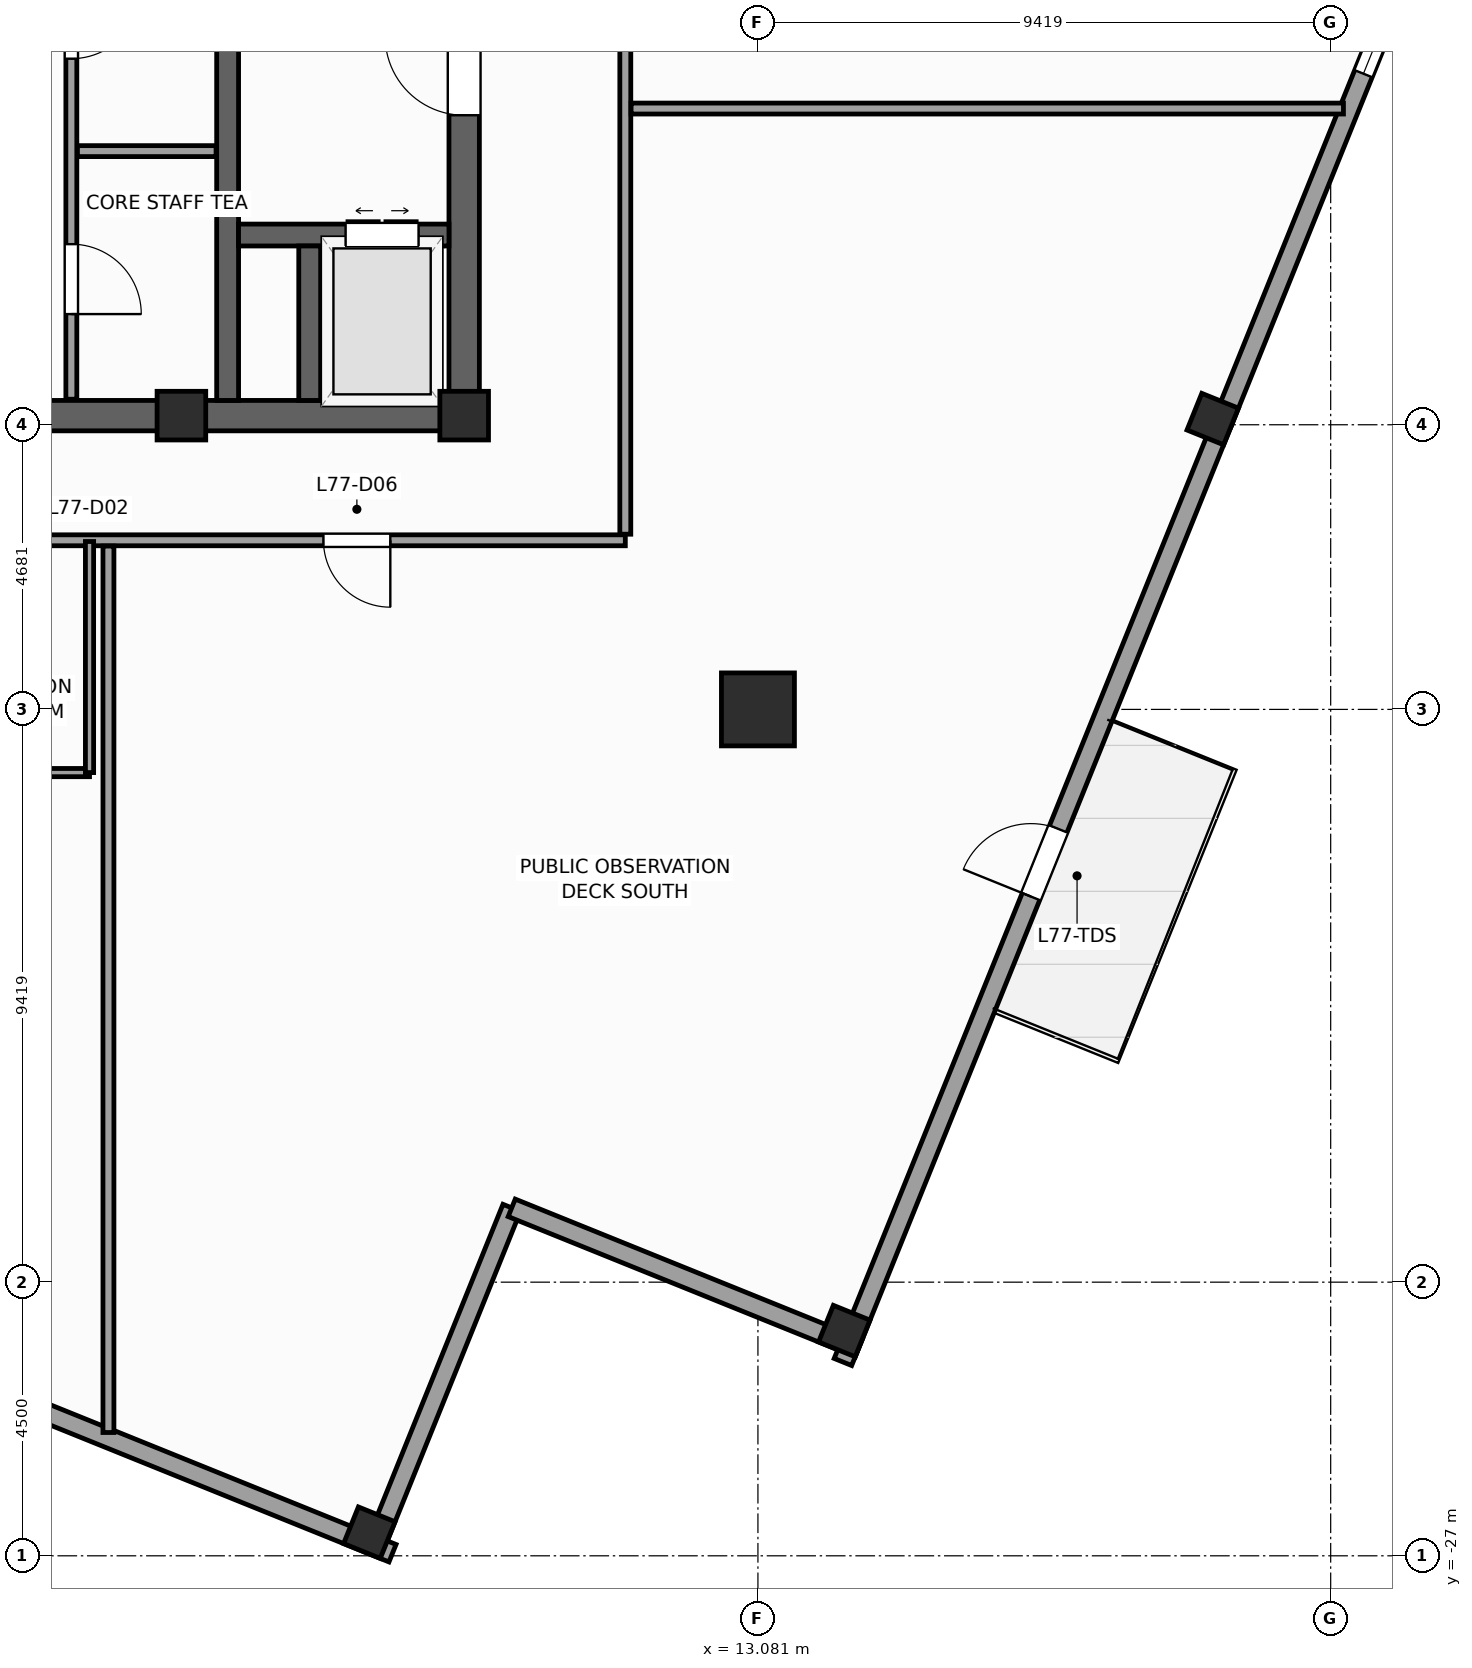
"""IFC4 building model, lengths in metres.
Left out: names, types, materials, properties, quantities, classifications, styles, units other than length and angle.
Written with IfcOpenShell. Run it as: python <this file> out.ifc"""

import sys

from ifc_helpers import new_model, si_unit, direction, frame, frame_2d, origin, origin_2d, place, context, subcontext, project, spatial, rectangle, extrude, source, transform, mapped, element, fill, save


model = new_model("IFC4")
c1 = context("Model", 3, precision=1e-05, world=origin(), true_north=direction((0.0, 1.0)))
c2 = subcontext(c1, "Body", "Model", "MODEL_VIEW")
j1 = project(units=[si_unit("LENGTHUNIT", "METRE"), si_unit("PLANEANGLEUNIT", "RADIAN")], contexts=[c1])
p1 = place(None, origin())
s1 = spatial("IfcSite", under=j1, at=p1, CompositionType="ELEMENT")
p2 = place(p1, origin())
s2 = spatial("IfcBuilding", under=s1, at=p2, CompositionType="ELEMENT")
p3 = place(p2, frame((0.0, 0.0, 312.0)))
s3 = spatial("IfcBuildingStorey", under=s2, at=p3, CompositionType="ELEMENT", Elevation=312.0)
p4 = place(p3, frame((-8.5, -8.25, 0.0), z_axis=(0.0, 0.0, 1.0), x_axis=(1.0, 0.0, 0.0)))
e1 = element("IfcWall", 1, at=p4, inside=s3, PredefinedType="SHEAR", context=c2, shape_type="SweptSolid", body=[
    extrude(rectangle(XDim=17.0, YDim=0.5, at=frame_2d((8.5, 0.0))), origin(), (0.0, 0.0, 1.0), 4.8),
])
p5 = place(p4, frame((7.85, 0.0, 0.0)))
e2 = element("IfcOpeningElement", 2, at=p5, cuts=e1, PredefinedType="OPENING", context=c2, shape_type="SweptSolid", body=[
    extrude(rectangle(XDim=1.3, YDim=2.2, at=frame_2d((0.65, 1.1))), frame((0.0, 0.26, 0.0), z_axis=(0.0, -1.0, 0.0), x_axis=(1.0, 0.0, 0.0)), (0.0, 0.0, 1.0), 0.52),
])
p6 = place(p3, frame((8.25, -8.0, 0.0), z_axis=(0.0, 0.0, 1.0), x_axis=(0.0, 1.0, 0.0)))
e3 = element("IfcWall", 3, at=p6, inside=s3, PredefinedType="SHEAR", context=c2, shape_type="SweptSolid", body=[
    extrude(rectangle(XDim=16.0, YDim=0.5, at=frame_2d((8.0, 0.0))), origin(), (0.0, 0.0, 1.0), 4.8),
])
p7 = place(p6, frame((4.69, 0.0, 0.0)))
e4 = element("IfcOpeningElement", 4, at=p7, cuts=e3, PredefinedType="OPENING", context=c2, shape_type="SweptSolid", body=[
    extrude(rectangle(XDim=1.3, YDim=2.2, at=frame_2d((0.65, 1.1))), frame((0.0, 0.26, 0.0), z_axis=(0.0, -1.0, 0.0), x_axis=(1.0, 0.0, 0.0)), (0.0, 0.0, 1.0), 0.52),
])
p8 = place(p3, frame((4.36, -8.0, 0.0), z_axis=(0.0, 0.0, 1.0), x_axis=(0.0, 1.0, 0.0)))
e5 = element("IfcWall", 5, at=p8, inside=s3, PredefinedType="SHEAR", context=c2, shape_type="SweptSolid", body=[
    extrude(rectangle(XDim=16.0, YDim=0.36, at=frame_2d((8.0, 0.0))), origin(), (0.0, 0.0, 1.0), 4.8),
])
p9 = place(p3, frame((4.54, -5.28, 0.0), z_axis=(0.0, 0.0, 1.0), x_axis=(1.0, 0.0, 0.0)))
e6 = element("IfcWall", 6, at=p9, inside=s3, PredefinedType="SHEAR", context=c2, shape_type="SweptSolid", body=[
    extrude(rectangle(XDim=3.46, YDim=0.36, at=frame_2d((1.73, 0.0))), origin(), (0.0, 0.0, 1.0), 4.8),
])
p10 = place(p9, frame((1.76, 0.0, 0.0)))
e7 = element("IfcOpeningElement", 7, at=p10, cuts=e6, PredefinedType="OPENING", context=c2, shape_type="SweptSolid", body=[
    extrude(rectangle(XDim=1.2, YDim=2.25, at=frame_2d((0.6, 1.125))), frame((0.0, 0.19, 0.0), z_axis=(0.0, -1.0, 0.0), x_axis=(1.0, 0.0, 0.0)), (0.0, 0.0, 1.0), 0.38),
])
p11 = place(p3, frame((5.71, -8.0, 0.0), z_axis=(0.0, 0.0, 1.0), x_axis=(0.0, 1.0, 0.0)))
e8 = element("IfcWall", 8, at=p11, inside=s3, PredefinedType="SHEAR", context=c2, shape_type="SweptSolid", body=[
    extrude(rectangle(XDim=2.54, YDim=0.36, at=frame_2d((1.27, 0.0))), origin(), (0.0, 0.0, 1.0), 4.8),
])
m1 = source(origin(), c2, "Body", "SweptSolid", [
    extrude(rectangle(XDim=0.8, YDim=0.8, at=origin_2d()), origin(), (0.0, 0.0, 1.0), 4.8),
])
for number, where, z_axis, x_axis in (
    (9, (8.25, -8.25, 0.0), (0.0, 0.0, 1.0), (1.0, 0.0, 0.0)),
    (10, (3.6, -8.25, 0.0), (0.0, 0.0, 1.0), (1.0, 0.0, 0.0)),
):
    element("IfcColumn", number, at=place(p3, frame(where, z_axis=z_axis, x_axis=x_axis)), inside=s3, PredefinedType="PILASTER", context=c2, shape_type="MappedRepresentation", body=[
        mapped(m1, transform((0.0, 0.0, 0.0), scale=1.0)),
    ])
m2 = source(origin(), c2, "Body", "SweptSolid", [
    extrude(rectangle(XDim=1.2, YDim=1.2, at=origin_2d()), origin(), (0.0, 0.0, 1.0), 4.8),
])
p12 = place(p3, frame((13.081, -13.081, 0.0), z_axis=(0.0, 0.0, 1.0), x_axis=(1.0, 0.0, 0.0)))
e11 = element("IfcColumn", 11, at=p12, inside=s3, PredefinedType="COLUMN", context=c2, shape_type="MappedRepresentation", body=[
    mapped(m2, transform((0.0, 0.0, 0.0), scale=1.0)),
])
m3 = source(origin(), c2, "Body", "SweptSolid", [
    extrude(rectangle(XDim=0.65, YDim=0.65, at=origin_2d()), origin(), (0.0, 0.0, 1.0), 4.8),
])
for number, where, z_axis, x_axis in (
    (12, (14.501, -23.304, 0.0), (0.0, 0.0, 1.0), (0.375, 0.927, 0.0)),
    (13, (20.56, -8.307, 0.0), (0.0, 0.0, 1.0), (0.375, 0.927, 0.0)),
    (14, (6.69, -26.62, 0.0), (0.0, 0.0, 1.0), (0.375, 0.927, 0.0)),
):
    element("IfcColumn", number, at=place(p3, frame(where, z_axis=z_axis, x_axis=x_axis)), inside=s3, PredefinedType="COLUMN", context=c2, shape_type="MappedRepresentation", body=[
        mapped(m3, transform((0.0, 0.0, 0.0), scale=1.0)),
    ])
p13 = place(p3, frame((6.784, -26.841, 0.0), z_axis=(0.0, 0.0, 1.0), x_axis=(0.374636620962, 0.927171722085, 0.0)))
e15 = element("IfcWall", 15, at=p13, inside=s3, PredefinedType="STANDARD", context=c2, shape_type="SweptSolid", body=[
    extrude(rectangle(XDim=6.0, YDim=0.31, at=frame_2d((3.0, 0.0))), origin(), (0.0, 0.0, 1.0), 3.85),
])
p14 = place(p3, frame((9.032, -21.278, 0.0), z_axis=(0.0, 0.0, 1.0), x_axis=(0.927185411764, -0.374602739196, 0.0)))
e16 = element("IfcWall", 16, at=p14, inside=s3, PredefinedType="STANDARD", context=c2, shape_type="SweptSolid", body=[
    extrude(rectangle(XDim=6.155, YDim=0.31, at=frame_2d((3.078, 0.0))), origin(), (0.0, 0.0, 1.0), 4.55),
])
p15 = place(p3, frame((14.479, -23.813, 0.0), z_axis=(0.0, 0.0, 1.0), x_axis=(0.374618403537, 0.927179082881, 0.0)))
e17 = element("IfcWall", 17, at=p15, inside=s3, PredefinedType="STANDARD", context=c2, shape_type="SweptSolid", body=[
    extrude(rectangle(XDim=16.655, YDim=0.31, at=frame_2d((8.328, 0.0))), origin(), (0.0, 0.0, 1.0), 3.95),
])
p16 = place(p15, frame((8.255, 0.0, 0.0)))
e18 = element("IfcOpeningElement", 18, at=p16, cuts=e17, PredefinedType="OPENING", context=c2, shape_type="SweptSolid", body=[
    extrude(rectangle(XDim=1.2, YDim=2.3, at=frame_2d((0.6, 1.15))), frame((0.0, 0.165, 0.0), z_axis=(0.0, -1.0, 0.0), x_axis=(1.0, 0.0, 0.0)), (0.0, 0.0, 1.0), 0.33),
])
p17 = place(p3, frame((20.718, -8.371, 0.0), z_axis=(0.0, 0.0, 1.0), x_axis=(0.374600710538, 0.927186231382, 0.0)))
e19 = element("IfcWall", 19, at=p17, inside=s3, PredefinedType="STANDARD", context=c2, shape_type="SweptSolid", body=[
    extrude(rectangle(XDim=16.655, YDim=0.31, at=frame_2d((8.328, 0.0))), origin(), (0.0, 0.0, 1.0), 3.95),
])
p18 = place(p17, frame((6.195, 0.0, 0.65)))
e20 = element("IfcOpeningElement", 20, at=p18, cuts=e19, PredefinedType="OPENING", context=c2, shape_type="SweptSolid", body=[
    extrude(rectangle(XDim=2.6, YDim=3.0, at=frame_2d((1.3, 1.5))), frame((0.0, 0.165, 0.0), z_axis=(0.0, -1.0, 0.0), x_axis=(1.0, 0.0, 0.0)), (0.0, 0.0, 1.0), 0.33),
])
p19 = place(p3, frame((-9.298, -20.343, 0.0), z_axis=(0.0, 0.0, 1.0), x_axis=(0.927183654967, -0.374607087443, 0.0)))
e21 = element("IfcWall", 21, at=p19, inside=s3, PredefinedType="STANDARD", context=c2, shape_type="SweptSolid", body=[
    extrude(rectangle(XDim=17.655, YDim=0.31, at=frame_2d((8.828, 0.0))), origin(), (0.0, 0.0, 1.0), 3.95),
])
p20 = place(p19, frame((6.645, 0.0, 0.65)))
e22 = element("IfcOpeningElement", 22, at=p20, cuts=e21, PredefinedType="OPENING", context=c2, shape_type="SweptSolid", body=[
    extrude(rectangle(XDim=2.6, YDim=3.0, at=frame_2d((1.3, 1.5))), frame((0.0, 0.165, 0.0), z_axis=(0.0, -1.0, 0.0), x_axis=(1.0, 0.0, 0.0)), (0.0, 0.0, 1.0), 0.33),
])
p21 = place(p3, frame((1.79, -7.98, 0.0), z_axis=(0.0, 0.0, 1.0), x_axis=(0.0, 1.0, 0.0)))
e23 = element("IfcWall", 23, at=p21, inside=s3, PredefinedType="PARTITIONING", context=c2, shape_type="SweptSolid", body=[
    extrude(rectangle(XDim=12.38, YDim=0.18, at=frame_2d((6.19, 0.0))), origin(), (0.0, 0.0, 1.0), 4.55),
])
p22 = place(p21, frame((8.8, 0.0, 0.0)))
e24 = element("IfcOpeningElement", 24, at=p22, cuts=e23, PredefinedType="OPENING", context=c2, shape_type="SweptSolid", body=[
    extrude(rectangle(XDim=1.1, YDim=2.2, at=frame_2d((0.55, 1.1))), frame((0.0, 0.1, 0.0), z_axis=(0.0, -1.0, 0.0), x_axis=(1.0, 0.0, 0.0)), (0.0, 0.0, 1.0), 0.2),
])
p23 = place(p21, frame((10.86, 0.0, 0.0)))
e25 = element("IfcOpeningElement", 25, at=p23, cuts=e23, PredefinedType="OPENING", context=c2, shape_type="SweptSolid", body=[
    extrude(rectangle(XDim=1.1, YDim=2.2, at=frame_2d((0.55, 1.1))), frame((0.0, 0.1, 0.0), z_axis=(0.0, -1.0, 0.0), x_axis=(1.0, 0.0, 0.0)), (0.0, 0.0, 1.0), 0.2),
])
p24 = place(p21, frame((1.4, 0.0, 0.0)))
e26 = element("IfcOpeningElement", 26, at=p24, cuts=e23, PredefinedType="OPENING", context=c2, shape_type="SweptSolid", body=[
    extrude(rectangle(XDim=1.15, YDim=2.25, at=frame_2d((0.575, 1.125))), frame((0.0, 0.1, 0.0), z_axis=(0.0, -1.0, 0.0), x_axis=(1.0, 0.0, 0.0)), (0.0, 0.0, 1.0), 0.2),
])
p25 = place(p21, frame((5.6, 0.0, 0.0)))
e27 = element("IfcOpeningElement", 27, at=p25, cuts=e23, PredefinedType="OPENING", context=c2, shape_type="SweptSolid", body=[
    extrude(rectangle(XDim=1.15, YDim=2.25, at=frame_2d((0.575, 1.125))), frame((0.0, 0.1, 0.0), z_axis=(0.0, -1.0, 0.0), x_axis=(1.0, 0.0, 0.0)), (0.0, 0.0, 1.0), 0.2),
])
p26 = place(p3, frame((1.89, -3.9, 0.0), z_axis=(0.0, 0.0, 1.0), x_axis=(1.0, 0.0, 0.0)))
e28 = element("IfcWall", 28, at=p26, inside=s3, PredefinedType="PARTITIONING", context=c2, shape_type="SweptSolid", body=[
    extrude(rectangle(XDim=2.28, YDim=0.18, at=frame_2d((1.14, 0.0))), origin(), (0.0, 0.0, 1.0), 4.55),
])
p27 = place(p3, frame((-10.3, -10.3, 0.0), z_axis=(0.0, 0.0, 1.0), x_axis=(1.0, 0.0, 0.0)))
e29 = element("IfcWall", 29, at=p27, inside=s3, PredefinedType="PARTITIONING", context=c2, shape_type="SweptSolid", body=[
    extrude(rectangle(XDim=21.2, YDim=0.18, at=frame_2d((10.6, 0.0))), origin(), (0.0, 0.0, 1.0), 4.55),
])
p28 = place(p27, frame((10.514, 0.0, 0.0)))
e30 = element("IfcOpeningElement", 30, at=p28, cuts=e29, PredefinedType="OPENING", context=c2, shape_type="SweptSolid", body=[
    extrude(rectangle(XDim=0.95, YDim=2.1, at=frame_2d((0.475, 1.05))), frame((0.0, 0.1, 0.0), z_axis=(0.0, -1.0, 0.0), x_axis=(1.0, 0.0, 0.0)), (0.0, 0.0, 1.0), 0.2),
])
p29 = place(p27, frame((16.236, 0.0, 0.0)))
e31 = element("IfcOpeningElement", 31, at=p29, cuts=e29, PredefinedType="OPENING", context=c2, shape_type="SweptSolid", body=[
    extrude(rectangle(XDim=1.1, YDim=2.2, at=frame_2d((0.55, 1.1))), frame((0.0, 0.1, 0.0), z_axis=(0.0, -1.0, 0.0), x_axis=(1.0, 0.0, 0.0)), (0.0, 0.0, 1.0), 0.2),
])
p30 = place(p27, frame((4.415, 0.0, 0.0)))
e32 = element("IfcOpeningElement", 32, at=p30, cuts=e29, PredefinedType="OPENING", context=c2, shape_type="SweptSolid", body=[
    extrude(rectangle(XDim=1.1, YDim=2.2, at=frame_2d((0.55, 1.1))), frame((0.0, 0.1, 0.0), z_axis=(0.0, -1.0, 0.0), x_axis=(1.0, 0.0, 0.0)), (0.0, 0.0, 1.0), 0.2),
])
p31 = place(p3, frame((10.9, -10.2, 0.0), z_axis=(0.0, 0.0, 1.0), x_axis=(0.0, 1.0, 0.0)))
e33 = element("IfcWall", 33, at=p31, inside=s3, PredefinedType="PARTITIONING", context=c2, shape_type="SweptSolid", body=[
    extrude(rectangle(XDim=21.0, YDim=0.18, at=frame_2d((10.5, 0.0))), origin(), (0.0, 0.0, 1.0), 4.55),
])
p32 = place(p31, frame((9.65, 0.0, 0.0)))
e34 = element("IfcOpeningElement", 34, at=p32, cuts=e33, PredefinedType="OPENING", context=c2, shape_type="SweptSolid", body=[
    extrude(rectangle(XDim=1.1, YDim=2.2, at=frame_2d((0.55, 1.1))), frame((0.0, 0.1, 0.0), z_axis=(0.0, -1.0, 0.0), x_axis=(1.0, 0.0, 0.0)), (0.0, 0.0, 1.0), 0.2),
])
p33 = place(p3, frame((10.995, -3.2, 0.0), z_axis=(0.0, 0.0, 1.0), x_axis=(1.0, 0.0, 0.0)))
e35 = element("IfcWall", 35, at=p33, inside=s3, PredefinedType="PARTITIONING", context=c2, shape_type="SweptSolid", body=[
    extrude(rectangle(XDim=11.715, YDim=0.18, at=frame_2d((5.857, 0.0))), origin(), (0.0, 0.0, 1.0), 4.55),
])
p34 = place(p3, frame((2.4, -10.395, 0.0), z_axis=(0.0, 0.0, 1.0), x_axis=(0.0, -1.0, 0.0)))
e36 = element("IfcWall", 36, at=p34, inside=s3, PredefinedType="PARTITIONING", context=c2, shape_type="SweptSolid", body=[
    extrude(rectangle(XDim=14.577, YDim=0.18, at=frame_2d((7.289, 0.0))), origin(), (0.0, 0.0, 1.0), 4.22),
])
p35 = place(p3, frame((-0.711, -14.12, 0.0), z_axis=(0.0, 0.0, 1.0), x_axis=(1.0, 0.0, 0.0)))
e37 = element("IfcWall", 37, at=p35, inside=s3, PredefinedType="PARTITIONING", context=c2, shape_type="SweptSolid", body=[
    extrude(rectangle(XDim=2.8, YDim=0.135, at=frame_2d((1.4, 0.0))), origin(), (0.0, 0.0, 1.0), 4.55),
])
p36 = place(p3, frame((2.089, -14.12, 0.0), z_axis=(0.0, 0.0, 1.0), x_axis=(0.0, 1.0, 0.0)))
e38 = element("IfcWall", 38, at=p36, inside=s3, PredefinedType="PARTITIONING", context=c2, shape_type="SweptSolid", body=[
    extrude(rectangle(XDim=3.8, YDim=0.135, at=frame_2d((1.9, 0.0))), origin(), (0.0, 0.0, 1.0), 4.55),
])
m4 = source(origin(), c2, "Body", "SweptSolid", [
    extrude(rectangle(XDim=2.6, YDim=3.0, at=frame_2d((1.3, 1.5))), frame((0.0, 0.03, 0.0), z_axis=(0.0, -1.0, 0.0), x_axis=(1.0, 0.0, 0.0)), (0.0, 0.0, 1.0), 0.06),
])
p37 = place(p18, origin())
e39 = element("IfcWindow", 39, at=p37, inside=s3, PartitioningType="SINGLE_PANEL", PredefinedType="WINDOW", context=c2, shape_type="MappedRepresentation", body=[
    mapped(m4, transform((0.0, 0.0, 0.0), scale=1.0)),
])
fill(e20, e39)
m5 = source(origin(), c2, "Body", "SweptSolid", [
    extrude(rectangle(XDim=1.2, YDim=2.3, at=frame_2d((0.6, 1.15))), frame((0.0, 0.025, 0.0), z_axis=(0.0, -1.0, 0.0), x_axis=(1.0, 0.0, 0.0)), (0.0, 0.0, 1.0), 0.05),
])
p38 = place(p16, origin())
e40 = element("IfcDoor", 40, at=p38, inside=s3, OperationType="SINGLE_SWING_LEFT", PredefinedType="DOOR", context=c2, shape_type="MappedRepresentation", body=[
    mapped(m5, transform((0.0, 0.0, 0.0), scale=1.0)),
])
fill(e18, e40)
m6 = source(origin(), c2, "Body", "SweptSolid", [
    extrude(rectangle(XDim=1.3, YDim=2.2, at=frame_2d((0.65, 1.1))), frame((0.0, 0.025, 0.0), z_axis=(0.0, -1.0, 0.0), x_axis=(1.0, 0.0, 0.0)), (0.0, 0.0, 1.0), 0.05),
])
p39 = place(p7, origin())
e41 = element("IfcDoor", 41, at=p39, inside=s3, OperationType="SINGLE_SWING_RIGHT", PredefinedType="DOOR", context=c2, shape_type="MappedRepresentation", body=[
    mapped(m6, transform((0.0, 0.0, 0.0), scale=1.0)),
])
fill(e4, e41)
m7 = source(origin(), c2, "Body", "SweptSolid", [
    extrude(rectangle(XDim=1.2, YDim=2.25, at=frame_2d((0.6, 1.125))), frame((0.0, 0.025, 0.0), z_axis=(0.0, -1.0, 0.0), x_axis=(1.0, 0.0, 0.0)), (0.0, 0.0, 1.0), 0.05),
])
p40 = place(p10, origin())
e42 = element("IfcDoor", 42, at=p40, inside=s3, OperationType="DOUBLE_DOOR_SLIDING", PredefinedType="DOOR", context=c2, shape_type="MappedRepresentation", body=[
    mapped(m7, transform((0.0, 0.0, 0.0), scale=1.0)),
])
fill(e7, e42)
m8 = source(origin(), c2, "Body", "SweptSolid", [
    extrude(rectangle(XDim=1.15, YDim=2.25, at=frame_2d((0.575, 1.125))), frame((0.0, 0.025, 0.0), z_axis=(0.0, -1.0, 0.0), x_axis=(1.0, 0.0, 0.0)), (0.0, 0.0, 1.0), 0.05),
])
p41 = place(p24, frame((1.15, 0.0, 0.0), z_axis=(0.0, 0.0, 1.0), x_axis=(-1.0, 0.0, 0.0)))
e43 = element("IfcDoor", 43, at=p41, inside=s3, OperationType="SINGLE_SWING_LEFT", PredefinedType="DOOR", context=c2, shape_type="MappedRepresentation", body=[
    mapped(m8, transform((0.0, 0.0, 0.0), scale=1.0)),
])
fill(e26, e43)
p42 = place(p25, frame((1.15, 0.0, 0.0), z_axis=(0.0, 0.0, 1.0), x_axis=(-1.0, 0.0, 0.0)))
e44 = element("IfcDoor", 44, at=p42, inside=s3, OperationType="SINGLE_SWING_RIGHT", PredefinedType="DOOR", context=c2, shape_type="MappedRepresentation", body=[
    mapped(m8, transform((0.0, 0.0, 0.0), scale=1.0)),
])
fill(e27, e44)
m9 = source(origin(), c2, "Body", "SweptSolid", [
    extrude(rectangle(XDim=1.1, YDim=2.2, at=frame_2d((0.55, 1.1))), frame((0.0, 0.025, 0.0), z_axis=(0.0, -1.0, 0.0), x_axis=(1.0, 0.0, 0.0)), (0.0, 0.0, 1.0), 0.05),
])
p43 = place(p29, frame((1.1, 0.0, 0.0), z_axis=(0.0, 0.0, 1.0), x_axis=(-1.0, 0.0, 0.0)))
e45 = element("IfcDoor", 45, at=p43, inside=s3, OperationType="SINGLE_SWING_RIGHT", PredefinedType="DOOR", context=c2, shape_type="MappedRepresentation", body=[
    mapped(m9, transform((0.0, 0.0, 0.0), scale=1.0)),
])
fill(e31, e45)
save(model, sys.argv[1])
